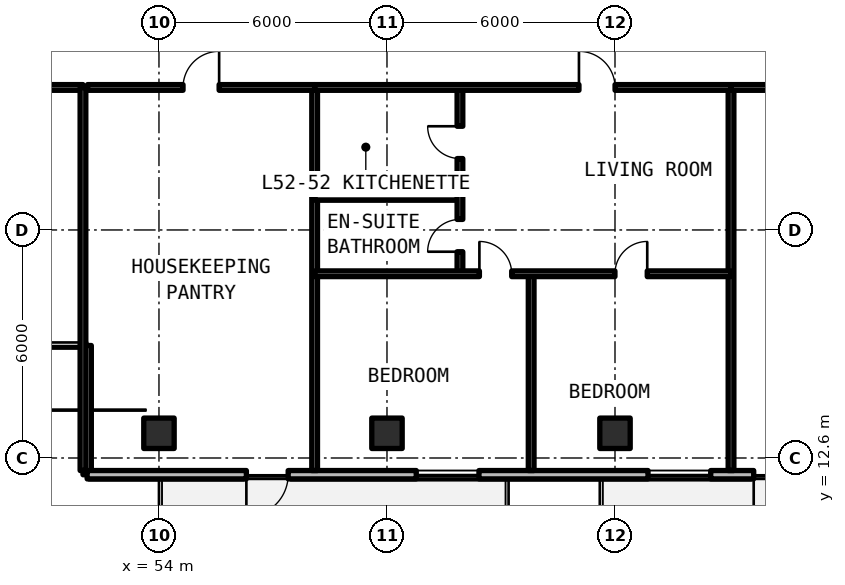
"""IFC4 building model, lengths in metres.
Left out: names, types, materials, properties, quantities, classifications, styles, units other than length and angle.
Written with IfcOpenShell. Run it as: python <this file> out.ifc"""

import sys

from ifc_helpers import new_model, si_unit, direction, frame, frame_2d, origin, origin_2d, place, context, subcontext, project, spatial, rectangle, extrude, element, fill, save


model = new_model("IFC4")
c1 = context("Model", 3, precision=1e-05, world=origin(), true_north=direction((0.0, 1.0)))
c2 = subcontext(c1, "Body", "Model", "MODEL_VIEW")
j1 = project(units=[si_unit("LENGTHUNIT", "METRE"), si_unit("PLANEANGLEUNIT", "RADIAN")], contexts=[c1])
p1 = place(None, origin())
s1 = spatial("IfcSite", under=j1, at=p1, CompositionType="ELEMENT")
p2 = place(p1, origin())
s2 = spatial("IfcBuilding", under=s1, at=p2, CompositionType="ELEMENT")
p3 = place(p2, frame((0.0, 0.0, 188.43)))
s3 = spatial("IfcBuildingStorey", under=s2, at=p3, CompositionType="ELEMENT", Elevation=188.43)
for number, where, z_axis, x_axis in (
    (1, (54.0, 13.25, 0.0), (0.0, 0.0, 1.0), (1.0, 0.0, 0.0)),
    (2, (60.0, 13.25, 0.0), (0.0, 0.0, 1.0), (1.0, 0.0, 0.0)),
    (3, (66.0, 13.25, 0.0), (0.0, 0.0, 1.0), (1.0, 0.0, 0.0)),
):
    element("IfcColumn", number, at=place(p3, frame(where, z_axis=z_axis, x_axis=x_axis)), inside=s3, PredefinedType="COLUMN", context=c2, shape_type="SweptSolid", body=[
        extrude(rectangle(XDim=0.8, YDim=0.8, at=origin_2d()), origin(), (0.0, 0.0, 1.0), 3.3),
    ])
p4 = place(p3, frame((52.11, 15.56, 0.0), z_axis=(0.0, 0.0, 1.0), x_axis=(0.0, -1.0, 0.0)))
e4 = element("IfcWall", 4, at=p4, inside=s3, PredefinedType="SOLIDWALL", context=c2, shape_type="SweptSolid", body=[
    extrude(rectangle(XDim=3.4, YDim=0.22, at=frame_2d((1.7, 0.0))), origin(), (0.0, 0.0, 1.0), 3.08),
])
p5 = place(p3, frame((52.11, 12.16, 0.0), z_axis=(0.0, 0.0, 1.0), x_axis=(1.0, 0.0, 0.0)))
e5 = element("IfcWall", 5, at=p5, inside=s3, PredefinedType="SOLIDWALL", context=c2, shape_type="SweptSolid", body=[
    extrude(rectangle(XDim=43.244, YDim=0.22, at=frame_2d((21.622, 0.0))), origin(), (0.0, 0.0, 1.0), 3.08),
])
p6 = place(p5, frame((4.19, 0.0, 0.0)))
e6 = element("IfcOpeningElement", 6, at=p6, cuts=e5, PredefinedType="OPENING", context=c2, shape_type="SweptSolid", body=[
    extrude(rectangle(XDim=1.1, YDim=2.15, at=frame_2d((0.55, 1.075))), frame((0.0, 0.12, 0.0), z_axis=(0.0, -1.0, 0.0), x_axis=(1.0, 0.0, 0.0)), (0.0, 0.0, 1.0), 0.24),
])
p7 = place(p5, frame((17.54, 0.0, 0.0)))
e7 = element("IfcOpeningElement", 7, at=p7, cuts=e5, PredefinedType="OPENING", context=c2, shape_type="SweptSolid", body=[
    extrude(rectangle(XDim=1.1, YDim=2.15, at=frame_2d((0.55, 1.075))), frame((0.0, 0.12, 0.0), z_axis=(0.0, -1.0, 0.0), x_axis=(1.0, 0.0, 0.0)), (0.0, 0.0, 1.0), 0.24),
])
p8 = place(p5, frame((28.89, 0.0, 0.0)))
e8 = element("IfcOpeningElement", 8, at=p8, cuts=e5, PredefinedType="OPENING", context=c2, shape_type="SweptSolid", body=[
    extrude(rectangle(XDim=1.1, YDim=2.15, at=frame_2d((0.55, 1.075))), frame((0.0, 0.12, 0.0), z_axis=(0.0, -1.0, 0.0), x_axis=(1.0, 0.0, 0.0)), (0.0, 0.0, 1.0), 0.24),
])
p9 = place(p5, frame((8.66, 0.0, 0.78)))
e9 = element("IfcOpeningElement", 9, at=p9, cuts=e5, PredefinedType="OPENING", context=c2, shape_type="SweptSolid", body=[
    extrude(rectangle(XDim=1.65, YDim=1.66, at=frame_2d((0.825, 0.83))), frame((0.0, 0.12, 0.0), z_axis=(0.0, -1.0, 0.0), x_axis=(1.0, 0.0, 0.0)), (0.0, 0.0, 1.0), 0.24),
])
p10 = place(p5, frame((14.759, 0.0, 0.78)))
e10 = element("IfcOpeningElement", 10, at=p10, cuts=e5, PredefinedType="OPENING", context=c2, shape_type="SweptSolid", body=[
    extrude(rectangle(XDim=1.65, YDim=1.66, at=frame_2d((0.825, 0.83))), frame((0.0, 0.12, 0.0), z_axis=(0.0, -1.0, 0.0), x_axis=(1.0, 0.0, 0.0)), (0.0, 0.0, 1.0), 0.24),
])
p11 = place(p5, frame((32.902, 0.0, 0.78)))
e11 = element("IfcOpeningElement", 11, at=p11, cuts=e5, PredefinedType="OPENING", context=c2, shape_type="SweptSolid", body=[
    extrude(rectangle(XDim=1.65, YDim=1.66, at=frame_2d((0.825, 0.83))), frame((0.0, 0.12, 0.0), z_axis=(0.0, -1.0, 0.0), x_axis=(1.0, 0.0, 0.0)), (0.0, 0.0, 1.0), 0.24),
])
p12 = place(p5, frame((38.313, 0.0, 0.78)))
e12 = element("IfcOpeningElement", 12, at=p12, cuts=e5, PredefinedType="OPENING", context=c2, shape_type="SweptSolid", body=[
    extrude(rectangle(XDim=0.85, YDim=1.65, at=frame_2d((0.425, 0.825))), frame((0.0, 0.12, 0.0), z_axis=(0.0, -1.0, 0.0), x_axis=(1.0, 0.0, 0.0)), (0.0, 0.0, 1.0), 0.24),
])
p13 = place(p5, frame((40.615, 0.0, 0.78)))
e13 = element("IfcOpeningElement", 13, at=p13, cuts=e5, PredefinedType="OPENING", context=c2, shape_type="SweptSolid", body=[
    extrude(rectangle(XDim=1.65, YDim=1.66, at=frame_2d((0.825, 0.83))), frame((0.0, 0.12, 0.0), z_axis=(0.0, -1.0, 0.0), x_axis=(1.0, 0.0, 0.0)), (0.0, 0.0, 1.0), 0.24),
])
p14 = place(p3, frame((43.6, 22.35, 0.0), z_axis=(0.0, 0.0, 1.0), x_axis=(1.0, 0.0, 0.0)))
e14 = element("IfcWall", 14, at=p14, inside=s3, PredefinedType="SOLIDWALL", context=c2, shape_type="SweptSolid", body=[
    extrude(rectangle(XDim=8.4, YDim=0.15, at=frame_2d((4.2, 0.0))), origin(), (0.0, 0.0, 1.0), 2.35),
])
p15 = place(p14, frame((3.65, 0.0, 0.0)))
e15 = element("IfcOpeningElement", 15, at=p15, cuts=e14, PredefinedType="OPENING", context=c2, shape_type="SweptSolid", body=[
    extrude(rectangle(XDim=1.1, YDim=2.15, at=frame_2d((0.55, 1.075))), frame((0.0, 0.085, 0.0), z_axis=(0.0, -1.0, 0.0), x_axis=(1.0, 0.0, 0.0)), (0.0, 0.0, 1.0), 0.17),
])
for number, where, z_axis, x_axis in (
    (16, (52.0, 12.27, 0.0), (0.0, 0.0, 1.0), (0.0, 1.0, 0.0)),
    (17, (58.096, 12.27, 0.0), (0.0, 0.0, 1.0), (0.0, 1.0, 0.0)),
):
    element("IfcWall", number, at=place(p3, frame(where, z_axis=z_axis, x_axis=x_axis)), inside=s3, PredefinedType="SOLIDWALL", context=c2, shape_type="SweptSolid", body=[
        extrude(rectangle(XDim=10.08, YDim=0.15, at=frame_2d((5.04, 0.0))), origin(), (0.0, 0.0, 1.0), 2.35),
    ])
p16 = place(p3, frame((52.12, 22.35, 0.0), z_axis=(0.0, 0.0, 1.0), x_axis=(1.0, 0.0, 0.0)))
e18 = element("IfcWall", 18, at=p16, inside=s3, PredefinedType="SOLIDWALL", context=c2, shape_type="SweptSolid", body=[
    extrude(rectangle(XDim=5.976, YDim=0.15, at=frame_2d((2.988, 0.0))), origin(), (0.0, 0.0, 1.0), 2.35),
])
p17 = place(p16, frame((2.513, 0.0, 0.0)))
e19 = element("IfcOpeningElement", 19, at=p17, cuts=e18, PredefinedType="OPENING", context=c2, shape_type="SweptSolid", body=[
    extrude(rectangle(XDim=0.95, YDim=2.15, at=frame_2d((0.475, 1.075))), frame((0.0, 0.085, 0.0), z_axis=(0.0, -1.0, 0.0), x_axis=(1.0, 0.0, 0.0)), (0.0, 0.0, 1.0), 0.17),
])
p18 = place(p3, frame((69.053, 12.27, 0.0), z_axis=(0.0, 0.0, 1.0), x_axis=(0.0, 1.0, 0.0)))
e20 = element("IfcWall", 20, at=p18, inside=s3, PredefinedType="SOLIDWALL", context=c2, shape_type="SweptSolid", body=[
    extrude(rectangle(XDim=10.08, YDim=0.15, at=frame_2d((5.04, 0.0))), origin(), (0.0, 0.0, 1.0), 2.35),
])
p19 = place(p3, frame((58.096, 19.458, 0.0), z_axis=(0.0, 0.0, 1.0), x_axis=(1.0, 0.0, 0.0)))
e21 = element("IfcWall", 21, at=p19, inside=s3, PredefinedType="PARTITIONING", context=c2, shape_type="SweptSolid", body=[
    extrude(rectangle(XDim=3.823, YDim=0.15, at=frame_2d((1.912, 0.0))), origin(), (0.0, 0.0, 1.0), 2.35),
])
p20 = place(p3, frame((61.92, 17.448, 0.0), z_axis=(0.0, 0.0, 1.0), x_axis=(0.0, 1.0, 0.0)))
e22 = element("IfcWall", 22, at=p20, inside=s3, PredefinedType="PARTITIONING", context=c2, shape_type="SweptSolid", body=[
    extrude(rectangle(XDim=4.902, YDim=0.15, at=frame_2d((2.451, 0.0))), origin(), (0.0, 0.0, 1.0), 2.35),
])
p21 = place(p20, frame((0.58, 0.0, 0.0)))
e23 = element("IfcOpeningElement", 23, at=p21, cuts=e22, PredefinedType="OPENING", context=c2, shape_type="SweptSolid", body=[
    extrude(rectangle(XDim=0.85, YDim=2.1, at=frame_2d((0.425, 1.05))), frame((0.0, 0.085, 0.0), z_axis=(0.0, -1.0, 0.0), x_axis=(1.0, 0.0, 0.0)), (0.0, 0.0, 1.0), 0.17),
])
p22 = place(p20, frame((3.031, 0.0, 0.0)))
e24 = element("IfcOpeningElement", 24, at=p22, cuts=e22, PredefinedType="OPENING", context=c2, shape_type="SweptSolid", body=[
    extrude(rectangle(XDim=0.85, YDim=2.1, at=frame_2d((0.425, 1.05))), frame((0.0, 0.085, 0.0), z_axis=(0.0, -1.0, 0.0), x_axis=(1.0, 0.0, 0.0)), (0.0, 0.0, 1.0), 0.17),
])
p23 = place(p3, frame((63.794, 12.27, 0.0), z_axis=(0.0, 0.0, 1.0), x_axis=(0.0, 1.0, 0.0)))
e25 = element("IfcWall", 25, at=p23, inside=s3, PredefinedType="PARTITIONING", context=c2, shape_type="SweptSolid", body=[
    extrude(rectangle(XDim=5.178, YDim=0.15, at=frame_2d((2.589, 0.0))), origin(), (0.0, 0.0, 1.0), 2.35),
])
p24 = place(p3, frame((58.096, 17.448, 0.0), z_axis=(0.0, 0.0, 1.0), x_axis=(1.0, 0.0, 0.0)))
e26 = element("IfcWall", 26, at=p24, inside=s3, PredefinedType="PARTITIONING", context=c2, shape_type="SweptSolid", body=[
    extrude(rectangle(XDim=10.957, YDim=0.15, at=frame_2d((5.479, 0.0))), origin(), (0.0, 0.0, 1.0), 2.35),
])
p25 = place(p24, frame((4.335, 0.0, 0.0)))
e27 = element("IfcOpeningElement", 27, at=p25, cuts=e26, PredefinedType="OPENING", context=c2, shape_type="SweptSolid", body=[
    extrude(rectangle(XDim=0.85, YDim=2.1, at=frame_2d((0.425, 1.05))), frame((0.0, 0.085, 0.0), z_axis=(0.0, -1.0, 0.0), x_axis=(1.0, 0.0, 0.0)), (0.0, 0.0, 1.0), 0.17),
])
p26 = place(p24, frame((7.902, 0.0, 0.0)))
e28 = element("IfcOpeningElement", 28, at=p26, cuts=e26, PredefinedType="OPENING", context=c2, shape_type="SweptSolid", body=[
    extrude(rectangle(XDim=0.85, YDim=2.1, at=frame_2d((0.425, 1.05))), frame((0.0, 0.085, 0.0), z_axis=(0.0, -1.0, 0.0), x_axis=(1.0, 0.0, 0.0)), (0.0, 0.0, 1.0), 0.17),
])
p27 = place(p3, frame((58.096, 22.35, 0.0), z_axis=(0.0, 0.0, 1.0), x_axis=(1.0, 0.0, 0.0)))
e29 = element("IfcWall", 29, at=p27, inside=s3, PredefinedType="SOLIDWALL", context=c2, shape_type="SweptSolid", body=[
    extrude(rectangle(XDim=10.957, YDim=0.15, at=frame_2d((5.479, 0.0))), origin(), (0.0, 0.0, 1.0), 2.35),
])
p28 = place(p27, frame((6.955, 0.0, 0.0)))
e30 = element("IfcOpeningElement", 30, at=p28, cuts=e29, PredefinedType="OPENING", context=c2, shape_type="SweptSolid", body=[
    extrude(rectangle(XDim=0.95, YDim=2.15, at=frame_2d((0.475, 1.075))), frame((0.0, 0.085, 0.0), z_axis=(0.0, -1.0, 0.0), x_axis=(1.0, 0.0, 0.0)), (0.0, 0.0, 1.0), 0.17),
])
p29 = place(p3, frame((69.053, 22.35, 0.0), z_axis=(0.0, 0.0, 1.0), x_axis=(1.0, 0.0, 0.0)))
e31 = element("IfcWall", 31, at=p29, inside=s3, PredefinedType="SOLIDWALL", context=c2, shape_type="SweptSolid", body=[
    extrude(rectangle(XDim=8.467, YDim=0.15, at=frame_2d((4.233, 0.0))), origin(), (0.0, 0.0, 1.0), 2.35),
])
p30 = place(p29, frame((3.683, 0.0, 0.0)))
e32 = element("IfcOpeningElement", 32, at=p30, cuts=e31, PredefinedType="OPENING", context=c2, shape_type="SweptSolid", body=[
    extrude(rectangle(XDim=1.1, YDim=2.15, at=frame_2d((0.55, 1.075))), frame((0.0, 0.085, 0.0), z_axis=(0.0, -1.0, 0.0), x_axis=(1.0, 0.0, 0.0)), (0.0, 0.0, 1.0), 0.17),
])
p31 = place(p6, frame((1.1, 0.0, 0.0), z_axis=(0.0, 0.0, 1.0), x_axis=(-1.0, 0.0, 0.0)))
e33 = element("IfcDoor", 33, at=p31, inside=s3, OperationType="SINGLE_SWING_RIGHT", PredefinedType="DOOR", context=c2, shape_type="SweptSolid", body=[
    extrude(rectangle(XDim=1.1, YDim=2.15, at=frame_2d((0.55, 1.075))), frame((0.0, 0.025, 0.0), z_axis=(0.0, -1.0, 0.0), x_axis=(1.0, 0.0, 0.0)), (0.0, 0.0, 1.0), 0.05),
])
fill(e6, e33)
p32 = place(p7, frame((1.1, 0.0, 0.0), z_axis=(0.0, 0.0, 1.0), x_axis=(-1.0, 0.0, 0.0)))
e34 = element("IfcDoor", 34, at=p32, inside=s3, OperationType="SINGLE_SWING_LEFT", PredefinedType="DOOR", context=c2, shape_type="SweptSolid", body=[
    extrude(rectangle(XDim=1.1, YDim=2.15, at=frame_2d((0.55, 1.075))), frame((0.0, 0.025, 0.0), z_axis=(0.0, -1.0, 0.0), x_axis=(1.0, 0.0, 0.0)), (0.0, 0.0, 1.0), 0.05),
])
fill(e7, e34)
p33 = place(p9, origin())
e35 = element("IfcWindow", 35, at=p33, inside=s3, PartitioningType="SINGLE_PANEL", PredefinedType="WINDOW", context=c2, shape_type="SweptSolid", body=[
    extrude(rectangle(XDim=1.65, YDim=1.66, at=frame_2d((0.825, 0.83))), frame((0.0, 0.03, 0.0), z_axis=(0.0, -1.0, 0.0), x_axis=(1.0, 0.0, 0.0)), (0.0, 0.0, 1.0), 0.06),
])
fill(e9, e35)
p34 = place(p10, origin())
e36 = element("IfcWindow", 36, at=p34, inside=s3, PartitioningType="SINGLE_PANEL", PredefinedType="WINDOW", context=c2, shape_type="SweptSolid", body=[
    extrude(rectangle(XDim=1.65, YDim=1.66, at=frame_2d((0.825, 0.83))), frame((0.0, 0.03, 0.0), z_axis=(0.0, -1.0, 0.0), x_axis=(1.0, 0.0, 0.0)), (0.0, 0.0, 1.0), 0.06),
])
fill(e10, e36)
p35 = place(p17, origin())
e37 = element("IfcDoor", 37, at=p35, inside=s3, OperationType="SINGLE_SWING_RIGHT", PredefinedType="DOOR", context=c2, shape_type="SweptSolid", body=[
    extrude(rectangle(XDim=0.95, YDim=2.15, at=frame_2d((0.475, 1.075))), frame((0.0, 0.025, 0.0), z_axis=(0.0, -1.0, 0.0), x_axis=(1.0, 0.0, 0.0)), (0.0, 0.0, 1.0), 0.05),
])
fill(e19, e37)
p36 = place(p21, origin())
e38 = element("IfcDoor", 38, at=p36, inside=s3, OperationType="SINGLE_SWING_LEFT", PredefinedType="DOOR", context=c2, shape_type="SweptSolid", body=[
    extrude(rectangle(XDim=0.85, YDim=2.1, at=frame_2d((0.425, 1.05))), frame((0.0, 0.025, 0.0), z_axis=(0.0, -1.0, 0.0), x_axis=(1.0, 0.0, 0.0)), (0.0, 0.0, 1.0), 0.05),
])
fill(e23, e38)
p37 = place(p22, origin())
e39 = element("IfcDoor", 39, at=p37, inside=s3, OperationType="SINGLE_SWING_RIGHT", PredefinedType="DOOR", context=c2, shape_type="SweptSolid", body=[
    extrude(rectangle(XDim=0.85, YDim=2.1, at=frame_2d((0.425, 1.05))), frame((0.0, 0.025, 0.0), z_axis=(0.0, -1.0, 0.0), x_axis=(1.0, 0.0, 0.0)), (0.0, 0.0, 1.0), 0.05),
])
fill(e24, e39)
p38 = place(p25, origin())
e40 = element("IfcDoor", 40, at=p38, inside=s3, OperationType="SINGLE_SWING_LEFT", PredefinedType="DOOR", context=c2, shape_type="SweptSolid", body=[
    extrude(rectangle(XDim=0.85, YDim=2.1, at=frame_2d((0.425, 1.05))), frame((0.0, 0.025, 0.0), z_axis=(0.0, -1.0, 0.0), x_axis=(1.0, 0.0, 0.0)), (0.0, 0.0, 1.0), 0.05),
])
fill(e27, e40)
p39 = place(p26, origin())
e41 = element("IfcDoor", 41, at=p39, inside=s3, OperationType="SINGLE_SWING_RIGHT", PredefinedType="DOOR", context=c2, shape_type="SweptSolid", body=[
    extrude(rectangle(XDim=0.85, YDim=2.1, at=frame_2d((0.425, 1.05))), frame((0.0, 0.025, 0.0), z_axis=(0.0, -1.0, 0.0), x_axis=(1.0, 0.0, 0.0)), (0.0, 0.0, 1.0), 0.05),
])
fill(e28, e41)
p40 = place(p28, origin())
e42 = element("IfcDoor", 42, at=p40, inside=s3, OperationType="SINGLE_SWING_LEFT", PredefinedType="DOOR", context=c2, shape_type="SweptSolid", body=[
    extrude(rectangle(XDim=0.95, YDim=2.15, at=frame_2d((0.475, 1.075))), frame((0.0, 0.025, 0.0), z_axis=(0.0, -1.0, 0.0), x_axis=(1.0, 0.0, 0.0)), (0.0, 0.0, 1.0), 0.05),
])
fill(e30, e42)
save(model, sys.argv[1])
